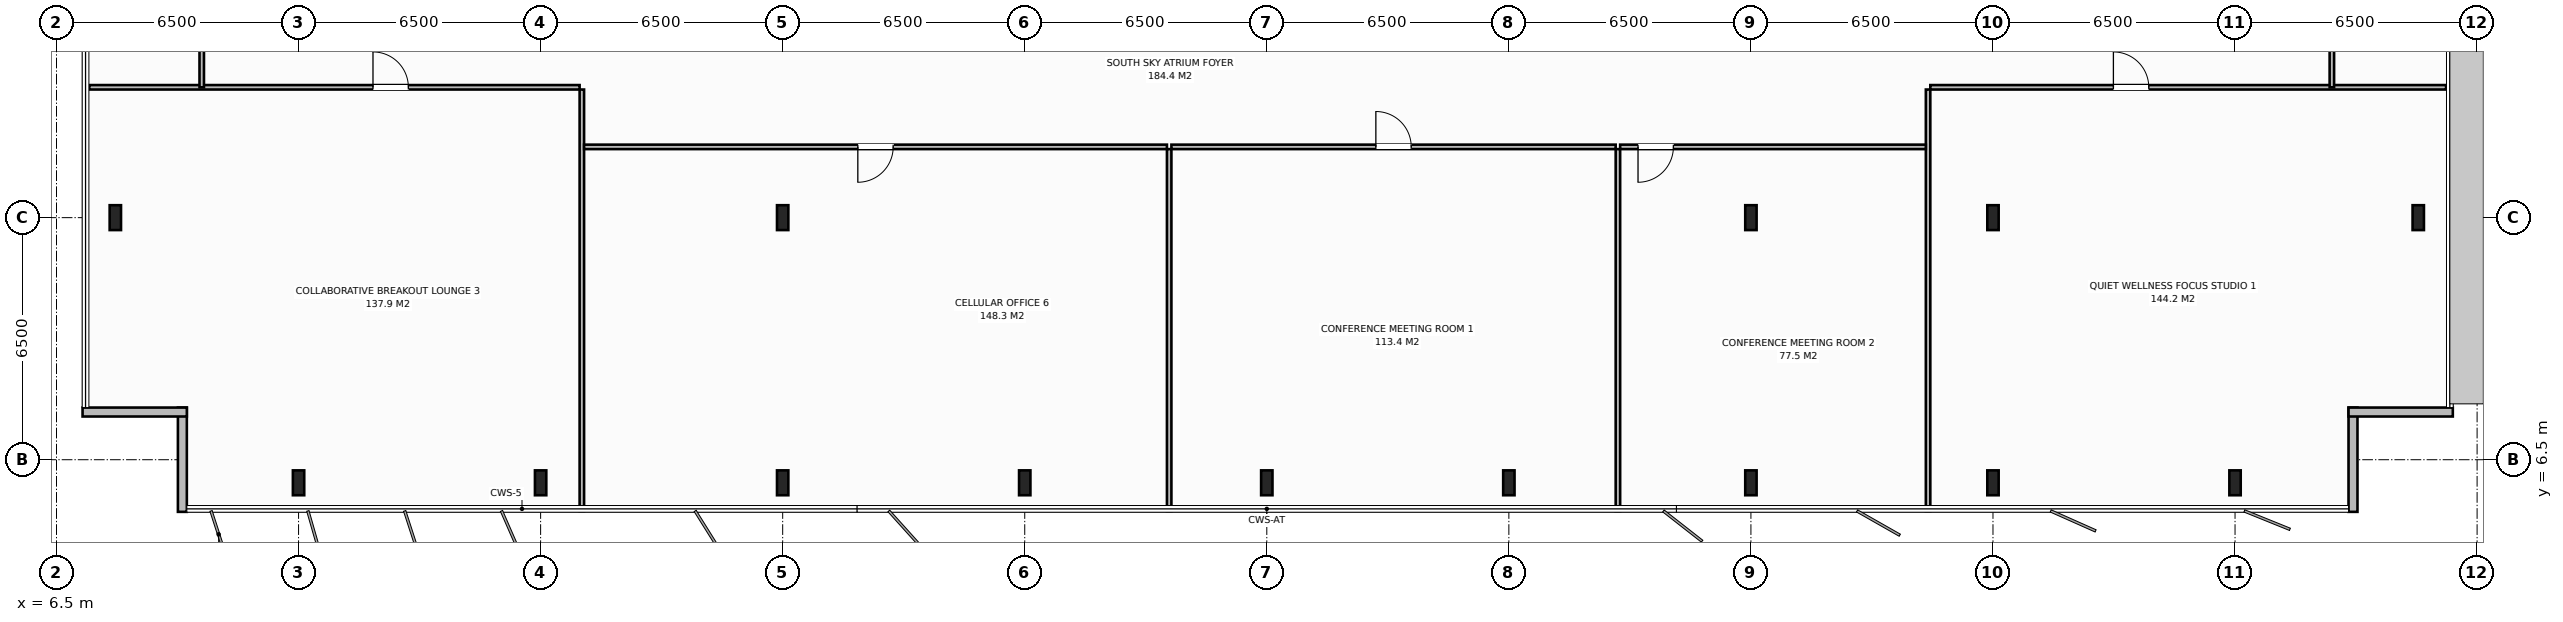
"""IFC4 building model, lengths in metres.
Left out: names, types, materials, properties, quantities, classifications, styles, units other than length and angle.
Written with IfcOpenShell. Run it as: python <this file> out.ifc"""

import sys

from ifc_helpers import new_model, si_unit, direction, frame, frame_2d, origin, origin_2d, place, context, subcontext, project, spatial, rectangle, i_section, extrude, element, fill, save


model = new_model("IFC4")
c1 = context("Model", 3, precision=1e-05, world=origin(), true_north=direction((0.0, 1.0)))
c2 = subcontext(c1, "Body", "Model", "MODEL_VIEW")
j1 = project(units=[si_unit("LENGTHUNIT", "METRE"), si_unit("PLANEANGLEUNIT", "RADIAN")], contexts=[c1])
p1 = place(None, origin())
s1 = spatial("IfcSite", under=j1, at=p1, CompositionType="ELEMENT")
p2 = place(p1, origin())
s2 = spatial("IfcBuilding", under=s1, at=p2, CompositionType="ELEMENT")
p3 = place(p2, frame((0.0, 0.0, 259.4)))
s3 = spatial("IfcBuildingStorey", under=s2, at=p3, CompositionType="ELEMENT", Elevation=259.4)
for number, where, z_axis, x_axis in (
    (1, (58.5, 13.0, 0.0), (0.0, 0.0, 1.0), (1.0, 0.0, 0.0)),
    (2, (26.0, 13.0, 0.0), (0.0, 0.0, 1.0), (1.0, 0.0, 0.0)),
    (3, (52.0, 13.0, 0.0), (0.0, 0.0, 1.0), (1.0, 0.0, 0.0)),
    (4, (13.0, 5.88, 0.0), (0.0, 0.0, 1.0), (1.0, 0.0, 0.0)),
    (5, (19.5, 5.88, 0.0), (0.0, 0.0, 1.0), (1.0, 0.0, 0.0)),
    (6, (26.0, 5.88, 0.0), (0.0, 0.0, 1.0), (1.0, 0.0, 0.0)),
    (7, (32.5, 5.88, 0.0), (0.0, 0.0, 1.0), (1.0, 0.0, 0.0)),
    (8, (39.0, 5.88, 0.0), (0.0, 0.0, 1.0), (1.0, 0.0, 0.0)),
    (9, (45.5, 5.88, 0.0), (0.0, 0.0, 1.0), (1.0, 0.0, 0.0)),
    (10, (52.0, 5.88, 0.0), (0.0, 0.0, 1.0), (1.0, 0.0, 0.0)),
    (11, (58.5, 5.88, 0.0), (0.0, 0.0, 1.0), (1.0, 0.0, 0.0)),
    (12, (65.0, 5.88, 0.0), (0.0, 0.0, 1.0), (1.0, 0.0, 0.0)),
    (13, (8.08, 13.0, 0.0), (0.0, 0.0, 1.0), (1.0, 0.0, 0.0)),
    (14, (69.92, 13.0, 0.0), (0.0, 0.0, 1.0), (1.0, 0.0, 0.0)),
):
    element("IfcColumn", number, at=place(p3, frame(where, z_axis=z_axis, x_axis=x_axis)), inside=s3, PredefinedType="COLUMN", context=c2, shape_type="SweptSolid", body=[
        extrude(i_section(OverallWidth=0.305, OverallDepth=0.668, WebThickness=0.021, FlangeThickness=0.04, at=origin_2d()), origin(), (0.0, 0.0, 1.0), 3.8),
    ])
p4 = place(p3, frame((9.88, 5.1, 0.0), z_axis=(0.0, 0.0, 1.0), x_axis=(0.0, 1.0, 0.0)))
e15 = element("IfcWall", 15, at=p4, inside=s3, PredefinedType="STANDARD", context=c2, shape_type="SweptSolid", body=[
    extrude(rectangle(XDim=2.8, YDim=0.24, at=frame_2d((1.4, 0.0))), origin(), (0.0, 0.0, 1.0), 3.588),
])
p5 = place(p3, frame((10.0, 7.78, 0.0), z_axis=(0.0, 0.0, 1.0), x_axis=(-1.0, 0.0, 0.0)))
e16 = element("IfcWall", 16, at=p5, inside=s3, PredefinedType="STANDARD", context=c2, shape_type="SweptSolid", body=[
    extrude(rectangle(XDim=2.8, YDim=0.24, at=frame_2d((1.4, 0.0))), origin(), (0.0, 0.0, 1.0), 3.588),
])
p6 = place(p3, frame((68.168, 7.9, 0.0), z_axis=(0.0, 0.0, 1.0), x_axis=(0.0, -1.0, 0.0)))
e17 = element("IfcWall", 17, at=p6, inside=s3, PredefinedType="STANDARD", context=c2, shape_type="SweptSolid", body=[
    extrude(rectangle(XDim=2.8, YDim=0.24, at=frame_2d((1.4, 0.0))), origin(), (0.0, 0.0, 1.0), 3.588),
])
p7 = place(p3, frame((70.848, 7.78, 0.0), z_axis=(0.0, 0.0, 1.0), x_axis=(-1.0, 0.0, 0.0)))
e18 = element("IfcWall", 18, at=p7, inside=s3, PredefinedType="STANDARD", context=c2, shape_type="SweptSolid", body=[
    extrude(rectangle(XDim=2.8, YDim=0.24, at=frame_2d((1.4, 0.0))), origin(), (0.0, 0.0, 1.0), 3.588),
])
p8 = place(p3, frame((20.607, 5.12, 0.0), z_axis=(0.0, 0.0, 1.0), x_axis=(0.0, 1.0, 0.0)))
e19 = element("IfcWall", 19, at=p8, inside=s3, PredefinedType="PARTITIONING", context=c2, shape_type="SweptSolid", body=[
    extrude(rectangle(XDim=11.32, YDim=0.12, at=frame_2d((5.66, 0.0))), origin(), (0.0, 0.0, 1.0), 3.588),
])
p9 = place(p3, frame((7.38, 16.5, 0.0), z_axis=(0.0, 0.0, 1.0), x_axis=(1.0, 0.0, 0.0)))
e20 = element("IfcWall", 20, at=p9, inside=s3, PredefinedType="PARTITIONING", context=c2, shape_type="SweptSolid", body=[
    extrude(rectangle(XDim=13.167, YDim=0.12, at=frame_2d((6.583, 0.0))), origin(), (0.0, 0.0, 1.0), 3.588),
])
p10 = place(p9, frame((7.619, 0.0, 0.0)))
e21 = element("IfcOpeningElement", 21, at=p10, cuts=e20, PredefinedType="OPENING", context=c2, shape_type="SweptSolid", body=[
    extrude(rectangle(XDim=0.95, YDim=2.15, at=frame_2d((0.475, 1.075))), frame((0.0, 0.07, 0.0), z_axis=(0.0, -1.0, 0.0), x_axis=(1.0, 0.0, 0.0)), (0.0, 0.0, 1.0), 0.14),
])
p11 = place(p3, frame((36.378, 5.12, 0.0), z_axis=(0.0, 0.0, 1.0), x_axis=(0.0, 1.0, 0.0)))
e22 = element("IfcWall", 22, at=p11, inside=s3, PredefinedType="PARTITIONING", context=c2, shape_type="SweptSolid", body=[
    extrude(rectangle(XDim=9.72, YDim=0.12, at=frame_2d((4.86, 0.0))), origin(), (0.0, 0.0, 1.0), 3.588),
])
p12 = place(p3, frame((20.667, 14.9, 0.0), z_axis=(0.0, 0.0, 1.0), x_axis=(1.0, 0.0, 0.0)))
e23 = element("IfcWall", 23, at=p12, inside=s3, PredefinedType="PARTITIONING", context=c2, shape_type="SweptSolid", body=[
    extrude(rectangle(XDim=15.651, YDim=0.12, at=frame_2d((7.826, 0.0))), origin(), (0.0, 0.0, 1.0), 3.588),
])
p13 = place(p12, frame((7.351, 0.0, 0.0)))
e24 = element("IfcOpeningElement", 24, at=p13, cuts=e23, PredefinedType="OPENING", context=c2, shape_type="SweptSolid", body=[
    extrude(rectangle(XDim=0.95, YDim=2.15, at=frame_2d((0.475, 1.075))), frame((0.0, 0.07, 0.0), z_axis=(0.0, -1.0, 0.0), x_axis=(1.0, 0.0, 0.0)), (0.0, 0.0, 1.0), 0.14),
])
p14 = place(p3, frame((48.428, 5.12, 0.0), z_axis=(0.0, 0.0, 1.0), x_axis=(0.0, 1.0, 0.0)))
e25 = element("IfcWall", 25, at=p14, inside=s3, PredefinedType="PARTITIONING", context=c2, shape_type="SweptSolid", body=[
    extrude(rectangle(XDim=9.72, YDim=0.12, at=frame_2d((4.86, 0.0))), origin(), (0.0, 0.0, 1.0), 3.588),
])
p15 = place(p3, frame((36.438, 14.9, 0.0), z_axis=(0.0, 0.0, 1.0), x_axis=(1.0, 0.0, 0.0)))
e26 = element("IfcWall", 26, at=p15, inside=s3, PredefinedType="PARTITIONING", context=c2, shape_type="SweptSolid", body=[
    extrude(rectangle(XDim=11.93, YDim=0.12, at=frame_2d((5.965, 0.0))), origin(), (0.0, 0.0, 1.0), 3.588),
])
p16 = place(p15, frame((5.49, 0.0, 0.0)))
e27 = element("IfcOpeningElement", 27, at=p16, cuts=e26, PredefinedType="OPENING", context=c2, shape_type="SweptSolid", body=[
    extrude(rectangle(XDim=0.95, YDim=2.15, at=frame_2d((0.475, 1.075))), frame((0.0, 0.07, 0.0), z_axis=(0.0, -1.0, 0.0), x_axis=(1.0, 0.0, 0.0)), (0.0, 0.0, 1.0), 0.14),
])
p17 = place(p3, frame((56.757, 5.12, 0.0), z_axis=(0.0, 0.0, 1.0), x_axis=(0.0, 1.0, 0.0)))
e28 = element("IfcWall", 28, at=p17, inside=s3, PredefinedType="PARTITIONING", context=c2, shape_type="SweptSolid", body=[
    extrude(rectangle(XDim=11.32, YDim=0.12, at=frame_2d((5.66, 0.0))), origin(), (0.0, 0.0, 1.0), 3.588),
])
p18 = place(p3, frame((48.489, 14.9, 0.0), z_axis=(0.0, 0.0, 1.0), x_axis=(1.0, 0.0, 0.0)))
e29 = element("IfcWall", 29, at=p18, inside=s3, PredefinedType="PARTITIONING", context=c2, shape_type="SweptSolid", body=[
    extrude(rectangle(XDim=8.209, YDim=0.12, at=frame_2d((4.104, 0.0))), origin(), (0.0, 0.0, 1.0), 3.588),
])
p19 = place(p18, frame((0.48, 0.0, 0.0)))
e30 = element("IfcOpeningElement", 30, at=p19, cuts=e29, PredefinedType="OPENING", context=c2, shape_type="SweptSolid", body=[
    extrude(rectangle(XDim=0.95, YDim=2.15, at=frame_2d((0.475, 1.075))), frame((0.0, 0.07, 0.0), z_axis=(0.0, -1.0, 0.0), x_axis=(1.0, 0.0, 0.0)), (0.0, 0.0, 1.0), 0.14),
])
p20 = place(p3, frame((56.817, 16.5, 0.0), z_axis=(0.0, 0.0, 1.0), x_axis=(1.0, 0.0, 0.0)))
e31 = element("IfcWall", 31, at=p20, inside=s3, PredefinedType="PARTITIONING", context=c2, shape_type="SweptSolid", body=[
    extrude(rectangle(XDim=13.851, YDim=0.12, at=frame_2d((6.925, 0.0))), origin(), (0.0, 0.0, 1.0), 3.588),
])
p21 = place(p20, frame((4.917, 0.0, 0.0)))
e32 = element("IfcOpeningElement", 32, at=p21, cuts=e31, PredefinedType="OPENING", context=c2, shape_type="SweptSolid", body=[
    extrude(rectangle(XDim=0.95, YDim=2.15, at=frame_2d((0.475, 1.075))), frame((0.0, 0.07, 0.0), z_axis=(0.0, -1.0, 0.0), x_axis=(1.0, 0.0, 0.0)), (0.0, 0.0, 1.0), 0.14),
])
p22 = place(p3, frame((10.4, 16.5, 0.0), z_axis=(0.0, 0.0, 1.0), x_axis=(0.0, 1.0, 0.0)))
e33 = element("IfcWall", 33, at=p22, inside=s3, PredefinedType="PARTITIONING", context=c2, shape_type="SweptSolid", body=[
    extrude(rectangle(XDim=6.333, YDim=0.12, at=frame_2d((3.167, 0.0))), origin(), (0.0, 0.0, 1.0), 3.588),
])
p23 = place(p22, frame((3.742, 0.0, 0.0)))
e34 = element("IfcOpeningElement", 34, at=p23, cuts=e33, PredefinedType="OPENING", context=c2, shape_type="SweptSolid", body=[
    extrude(rectangle(XDim=0.95, YDim=2.15, at=frame_2d((0.475, 1.075))), frame((0.0, 0.07, 0.0), z_axis=(0.0, -1.0, 0.0), x_axis=(1.0, 0.0, 0.0)), (0.0, 0.0, 1.0), 0.14),
])
p24 = place(p3, frame((67.6, 16.5, 0.0), z_axis=(0.0, 0.0, 1.0), x_axis=(0.0, 1.0, 0.0)))
e35 = element("IfcWall", 35, at=p24, inside=s3, PredefinedType="PARTITIONING", context=c2, shape_type="SweptSolid", body=[
    extrude(rectangle(XDim=19.0, YDim=0.12, at=frame_2d((9.5, 0.0))), origin(), (0.0, 0.0, 1.0), 3.588),
])
p25 = place(p24, frame((9.025, 0.0, 0.0)))
e36 = element("IfcOpeningElement", 36, at=p25, cuts=e35, PredefinedType="OPENING", context=c2, shape_type="SweptSolid", body=[
    extrude(rectangle(XDim=0.95, YDim=2.15, at=frame_2d((0.475, 1.075))), frame((0.0, 0.07, 0.0), z_axis=(0.0, -1.0, 0.0), x_axis=(1.0, 0.0, 0.0)), (0.0, 0.0, 1.0), 0.14),
])
p26 = place(p10, origin())
e37 = element("IfcDoor", 37, at=p26, inside=s3, OperationType="SINGLE_SWING_LEFT", PredefinedType="DOOR", context=c2, shape_type="SweptSolid", body=[
    extrude(rectangle(XDim=0.95, YDim=2.15, at=frame_2d((0.475, 1.075))), frame((0.0, 0.025, 0.0), z_axis=(0.0, -1.0, 0.0), x_axis=(1.0, 0.0, 0.0)), (0.0, 0.0, 1.0), 0.05),
])
fill(e21, e37)
p27 = place(p13, origin())
e38 = element("IfcDoor", 38, at=p27, inside=s3, OperationType="SINGLE_SWING_RIGHT", PredefinedType="DOOR", context=c2, shape_type="SweptSolid", body=[
    extrude(rectangle(XDim=0.95, YDim=2.15, at=frame_2d((0.475, 1.075))), frame((0.0, 0.025, 0.0), z_axis=(0.0, -1.0, 0.0), x_axis=(1.0, 0.0, 0.0)), (0.0, 0.0, 1.0), 0.05),
])
fill(e24, e38)
p28 = place(p16, origin())
e39 = element("IfcDoor", 39, at=p28, inside=s3, OperationType="SINGLE_SWING_LEFT", PredefinedType="DOOR", context=c2, shape_type="SweptSolid", body=[
    extrude(rectangle(XDim=0.95, YDim=2.15, at=frame_2d((0.475, 1.075))), frame((0.0, 0.025, 0.0), z_axis=(0.0, -1.0, 0.0), x_axis=(1.0, 0.0, 0.0)), (0.0, 0.0, 1.0), 0.05),
])
fill(e27, e39)
p29 = place(p19, origin())
e40 = element("IfcDoor", 40, at=p29, inside=s3, OperationType="SINGLE_SWING_RIGHT", PredefinedType="DOOR", context=c2, shape_type="SweptSolid", body=[
    extrude(rectangle(XDim=0.95, YDim=2.15, at=frame_2d((0.475, 1.075))), frame((0.0, 0.025, 0.0), z_axis=(0.0, -1.0, 0.0), x_axis=(1.0, 0.0, 0.0)), (0.0, 0.0, 1.0), 0.05),
])
fill(e30, e40)
p30 = place(p21, origin())
e41 = element("IfcDoor", 41, at=p30, inside=s3, OperationType="SINGLE_SWING_LEFT", PredefinedType="DOOR", context=c2, shape_type="SweptSolid", body=[
    extrude(rectangle(XDim=0.95, YDim=2.15, at=frame_2d((0.475, 1.075))), frame((0.0, 0.025, 0.0), z_axis=(0.0, -1.0, 0.0), x_axis=(1.0, 0.0, 0.0)), (0.0, 0.0, 1.0), 0.05),
])
fill(e32, e41)
save(model, sys.argv[1])
